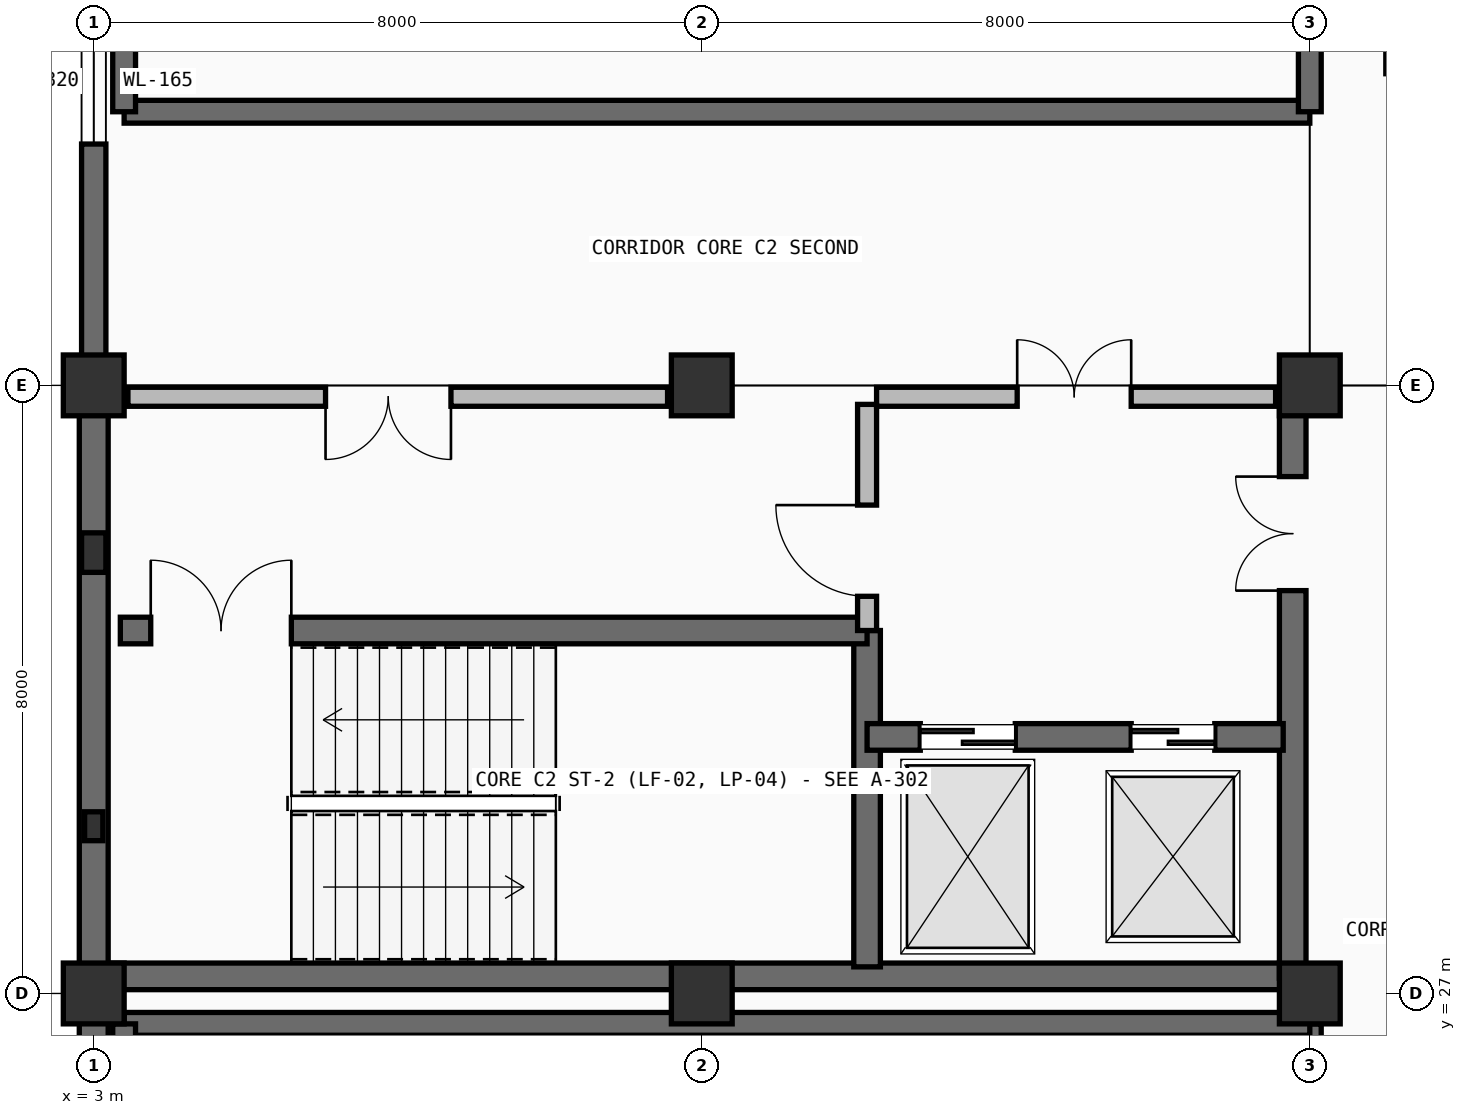
"""IFC4 building model, lengths in metres.
Left out: names, types, materials, properties, quantities, classifications, styles, units other than length and angle.
Written with IfcOpenShell. Run it as: python <this file> out.ifc"""

import sys

from ifc_helpers import new_model, si_unit, direction, frame, frame_2d, origin, origin_2d, place, context, subcontext, project, spatial, rectangle, extrude, element, fill, save


model = new_model("IFC4")
c1 = context("Model", 3, precision=1e-05, world=origin(), true_north=direction((0.0, 1.0)))
c2 = subcontext(c1, "Body", "Model", "MODEL_VIEW")
j1 = project(units=[si_unit("LENGTHUNIT", "METRE"), si_unit("PLANEANGLEUNIT", "RADIAN")], contexts=[c1])
p1 = place(None, origin())
s1 = spatial("IfcSite", under=j1, at=p1, CompositionType="ELEMENT")
p2 = place(p1, origin())
s2 = spatial("IfcBuilding", under=s1, at=p2, CompositionType="ELEMENT")
p3 = place(p2, frame((0.0, 0.0, 9.9)))
s3 = spatial("IfcBuildingStorey", under=s2, at=p3, CompositionType="ELEMENT", Elevation=9.9)
for number, where, z_axis, x_axis in (
    (1, (3.0, 27.0, 0.0), (0.0, 0.0, 1.0), (1.0, 0.0, 0.0)),
    (2, (3.0, 35.0, 0.0), (0.0, 0.0, 1.0), (1.0, 0.0, 0.0)),
    (3, (11.0, 27.0, 0.0), (0.0, 0.0, 1.0), (1.0, 0.0, 0.0)),
    (4, (11.0, 35.0, 0.0), (0.0, 0.0, 1.0), (1.0, 0.0, 0.0)),
    (5, (19.0, 27.0, 0.0), (0.0, 0.0, 1.0), (1.0, 0.0, 0.0)),
    (6, (19.0, 35.0, 0.0), (0.0, 0.0, 1.0), (1.0, 0.0, 0.0)),
):
    element("IfcColumn", number, at=place(p3, frame(where, z_axis=z_axis, x_axis=x_axis)), inside=s3, PredefinedType="COLUMN", context=c2, shape_type="SweptSolid", body=[
        extrude(rectangle(XDim=0.8, YDim=0.8, at=origin_2d()), origin(), (0.0, 0.0, 1.0), 4.5),
    ])
p4 = place(p3, frame((3.0, 29.2, 0.0), z_axis=(0.0, 0.0, 1.0), x_axis=(0.0, 1.0, 0.0)))
e7 = element("IfcColumn", 7, at=p4, inside=s3, PredefinedType="PILASTER", context=c2, shape_type="SweptSolid", body=[
    extrude(rectangle(XDim=0.38, YDim=0.24, at=origin_2d()), origin(), (0.0, 0.0, 1.0), 4.5),
])
p5 = place(p3, frame((3.0, 32.8, 0.0), z_axis=(0.0, 0.0, 1.0), x_axis=(0.0, 1.0, 0.0)))
e8 = element("IfcColumn", 8, at=p5, inside=s3, PredefinedType="PILASTER", context=c2, shape_type="SweptSolid", body=[
    extrude(rectangle(XDim=0.52, YDim=0.32, at=origin_2d()), origin(), (0.0, 0.0, 1.0), 4.5),
])
p6 = place(p3, frame((3.0, 19.0, 0.0), z_axis=(0.0, 0.0, 1.0), x_axis=(0.0, 1.0, 0.0)))
e9 = element("IfcWall", 9, at=p6, inside=s3, PredefinedType="SOLIDWALL", context=c2, shape_type="SweptSolid", body=[
    extrude(rectangle(XDim=8.0, YDim=0.38, at=frame_2d((4.0, 0.0))), origin(), (0.0, 0.0, 1.0), 4.5),
])
p7 = place(p6, frame((1.26, 0.0, 1.05)))
e10 = element("IfcOpeningElement", 10, at=p7, cuts=e9, PredefinedType="OPENING", context=c2, shape_type="SweptSolid", body=[
    extrude(rectangle(XDim=1.32, YDim=2.05, at=frame_2d((0.66, 1.025))), frame((0.0, 0.2, 0.0), z_axis=(0.0, -1.0, 0.0), x_axis=(1.0, 0.0, 0.0)), (0.0, 0.0, 1.0), 0.4),
])
p8 = place(p6, frame((3.4, 0.0, 1.05)))
e11 = element("IfcOpeningElement", 11, at=p8, cuts=e9, PredefinedType="OPENING", context=c2, shape_type="SweptSolid", body=[
    extrude(rectangle(XDim=1.2, YDim=1.9, at=frame_2d((0.6, 0.95))), frame((0.0, 0.2, 0.0), z_axis=(0.0, -1.0, 0.0), x_axis=(1.0, 0.0, 0.0)), (0.0, 0.0, 1.0), 0.4),
])
p9 = place(p6, frame((5.51, 0.0, 1.05)))
e12 = element("IfcOpeningElement", 12, at=p9, cuts=e9, PredefinedType="OPENING", context=c2, shape_type="SweptSolid", body=[
    extrude(rectangle(XDim=1.14, YDim=1.8, at=frame_2d((0.57, 0.9))), frame((0.0, 0.2, 0.0), z_axis=(0.0, -1.0, 0.0), x_axis=(1.0, 0.0, 0.0)), (0.0, 0.0, 1.0), 0.4),
])
p10 = place(p3, frame((3.0, 27.0, 0.0), z_axis=(0.0, 0.0, 1.0), x_axis=(0.0, 1.0, 0.0)))
e13 = element("IfcWall", 13, at=p10, inside=s3, PredefinedType="SOLIDWALL", context=c2, shape_type="SweptSolid", body=[
    extrude(rectangle(XDim=8.0, YDim=0.38, at=frame_2d((4.0, 0.0))), origin(), (0.0, 0.0, 1.0), 4.5),
])
p11 = place(p3, frame((3.0, 35.0, 0.0), z_axis=(0.0, 0.0, 1.0), x_axis=(0.0, 1.0, 0.0)))
e14 = element("IfcWall", 14, at=p11, inside=s3, PredefinedType="SOLIDWALL", context=c2, shape_type="SweptSolid", body=[
    extrude(rectangle(XDim=8.0, YDim=0.32, at=frame_2d((4.0, 0.0))), origin(), (0.0, 0.0, 1.0), 4.5),
])
p12 = place(p11, frame((3.175, 0.0, 1.1)))
e15 = element("IfcOpeningElement", 15, at=p12, cuts=e14, PredefinedType="OPENING", context=c2, shape_type="SweptSolid", body=[
    extrude(rectangle(XDim=1.65, YDim=0.8, at=frame_2d((0.825, 0.4))), frame((0.0, 0.17, 0.0), z_axis=(0.0, -1.0, 0.0), x_axis=(1.0, 0.0, 0.0)), (0.0, 0.0, 1.0), 0.34),
])
p13 = place(p3, frame((3.2, 27.225, 0.0), z_axis=(0.0, 0.0, 1.0), x_axis=(1.0, 0.0, 0.0)))
e16 = element("IfcWall", 16, at=p13, inside=s3, PredefinedType="SHEAR", context=c2, shape_type="SweptSolid", body=[
    extrude(rectangle(XDim=15.6, YDim=0.35, at=frame_2d((7.8, 0.0))), origin(), (0.0, 0.0, 1.0), 4.2),
])
p14 = place(p3, frame((13.175, 27.35, 0.0), z_axis=(0.0, 0.0, 1.0), x_axis=(0.0, 1.0, 0.0)))
e17 = element("IfcWall", 17, at=p14, inside=s3, PredefinedType="SHEAR", context=c2, shape_type="SweptSolid", body=[
    extrude(rectangle(XDim=4.425, YDim=0.35, at=frame_2d((2.212, 0.0))), origin(), (0.0, 0.0, 1.0), 4.2),
])
p15 = place(p3, frame((18.775, 27.2, 0.0), z_axis=(0.0, 0.0, 1.0), x_axis=(0.0, 1.0, 0.0)))
e18 = element("IfcWall", 18, at=p15, inside=s3, PredefinedType="SHEAR", context=c2, shape_type="SweptSolid", body=[
    extrude(rectangle(XDim=7.6, YDim=0.35, at=frame_2d((3.8, 0.0))), origin(), (0.0, 0.0, 1.0), 4.2),
])
p16 = place(p15, frame((5.1, 0.0, 0.0)))
e19 = element("IfcOpeningElement", 19, at=p16, cuts=e18, PredefinedType="OPENING", context=c2, shape_type="SweptSolid", body=[
    extrude(rectangle(XDim=1.5, YDim=2.2, at=frame_2d((0.75, 1.1))), frame((0.0, 0.185, 0.0), z_axis=(0.0, -1.0, 0.0), x_axis=(1.0, 0.0, 0.0)), (0.0, 0.0, 1.0), 0.37),
])
p17 = place(p3, frame((3.35, 31.775, 0.0), z_axis=(0.0, 0.0, 1.0), x_axis=(1.0, 0.0, 0.0)))
e20 = element("IfcWall", 20, at=p17, inside=s3, PredefinedType="SHEAR", context=c2, shape_type="SweptSolid", body=[
    extrude(rectangle(XDim=9.825, YDim=0.35, at=frame_2d((4.913, 0.0))), origin(), (0.0, 0.0, 1.0), 4.2),
])
p18 = place(p17, frame((0.4, 0.0, 0.0)))
e21 = element("IfcOpeningElement", 21, at=p18, cuts=e20, PredefinedType="OPENING", context=c2, shape_type="SweptSolid", body=[
    extrude(rectangle(XDim=1.85, YDim=2.25, at=frame_2d((0.925, 1.125))), frame((0.0, 0.185, 0.0), z_axis=(0.0, -1.0, 0.0), x_axis=(1.0, 0.0, 0.0)), (0.0, 0.0, 1.0), 0.37),
])
p19 = place(p3, frame((13.175, 30.375, 0.0), z_axis=(0.0, 0.0, 1.0), x_axis=(1.0, 0.0, 0.0)))
e22 = element("IfcWall", 22, at=p19, inside=s3, PredefinedType="SHEAR", context=c2, shape_type="SweptSolid", body=[
    extrude(rectangle(XDim=5.475, YDim=0.35, at=frame_2d((2.737, 0.0))), origin(), (0.0, 0.0, 1.0), 4.2),
])
p20 = place(p19, frame((0.7, 0.0, 0.0)))
e23 = element("IfcOpeningElement", 23, at=p20, cuts=e22, PredefinedType="OPENING", context=c2, shape_type="SweptSolid", body=[
    extrude(rectangle(XDim=1.25, YDim=2.25, at=frame_2d((0.625, 1.125))), frame((0.0, 0.185, 0.0), z_axis=(0.0, -1.0, 0.0), x_axis=(1.0, 0.0, 0.0)), (0.0, 0.0, 1.0), 0.37),
])
p21 = place(p19, frame((3.475, 0.0, 0.0)))
e24 = element("IfcOpeningElement", 24, at=p21, cuts=e22, PredefinedType="OPENING", context=c2, shape_type="SweptSolid", body=[
    extrude(rectangle(XDim=1.1, YDim=2.2, at=frame_2d((0.55, 1.1))), frame((0.0, 0.185, 0.0), z_axis=(0.0, -1.0, 0.0), x_axis=(1.0, 0.0, 0.0)), (0.0, 0.0, 1.0), 0.37),
])
p22 = place(p3, frame((13.175, 31.775, 0.0), z_axis=(0.0, 0.0, 1.0), x_axis=(0.0, 1.0, 0.0)))
e25 = element("IfcWall", 25, at=p22, inside=s3, PredefinedType="PARTITIONING", context=c2, shape_type="SweptSolid", body=[
    extrude(rectangle(XDim=2.975, YDim=0.25, at=frame_2d((1.488, 0.0))), origin(), (0.0, 0.0, 1.0), 4.2),
])
p23 = place(p22, frame((0.45, 0.0, 0.0)))
e26 = element("IfcOpeningElement", 26, at=p23, cuts=e25, PredefinedType="OPENING", context=c2, shape_type="SweptSolid", body=[
    extrude(rectangle(XDim=1.2, YDim=2.2, at=frame_2d((0.6, 1.1))), frame((0.0, 0.135, 0.0), z_axis=(0.0, -1.0, 0.0), x_axis=(1.0, 0.0, 0.0)), (0.0, 0.0, 1.0), 0.27),
])
p24 = place(p3, frame((3.45, 34.85, 0.0), z_axis=(0.0, 0.0, 1.0), x_axis=(1.0, 0.0, 0.0)))
e27 = element("IfcWall", 27, at=p24, inside=s3, PredefinedType="PARTITIONING", context=c2, shape_type="SweptSolid", body=[
    extrude(rectangle(XDim=7.1, YDim=0.25, at=frame_2d((3.55, 0.0))), origin(), (0.0, 0.0, 1.0), 3.535),
])
p25 = place(p24, frame((2.6, 0.0, 0.0)))
e28 = element("IfcOpeningElement", 28, at=p25, cuts=e27, PredefinedType="OPENING", context=c2, shape_type="SweptSolid", body=[
    extrude(rectangle(XDim=1.65, YDim=2.25, at=frame_2d((0.825, 1.125))), frame((0.0, 0.135, 0.0), z_axis=(0.0, -1.0, 0.0), x_axis=(1.0, 0.0, 0.0)), (0.0, 0.0, 1.0), 0.27),
])
p26 = place(p3, frame((13.3, 34.85, 0.0), z_axis=(0.0, 0.0, 1.0), x_axis=(1.0, 0.0, 0.0)))
e29 = element("IfcWall", 29, at=p26, inside=s3, PredefinedType="PARTITIONING", context=c2, shape_type="SweptSolid", body=[
    extrude(rectangle(XDim=5.25, YDim=0.25, at=frame_2d((2.625, 0.0))), origin(), (0.0, 0.0, 1.0), 3.535),
])
p27 = place(p26, frame((1.85, 0.0, 0.0)))
e30 = element("IfcOpeningElement", 30, at=p27, cuts=e29, PredefinedType="OPENING", context=c2, shape_type="SweptSolid", body=[
    extrude(rectangle(XDim=1.5, YDim=2.2, at=frame_2d((0.75, 1.1))), frame((0.0, 0.135, 0.0), z_axis=(0.0, -1.0, 0.0), x_axis=(1.0, 0.0, 0.0)), (0.0, 0.0, 1.0), 0.27),
])
p28 = place(p3, frame((19.0, 14.6, 0.0), z_axis=(0.0, 0.0, 1.0), x_axis=(0.0, 1.0, 0.0)))
e31 = element("IfcWall", 31, at=p28, inside=s3, PredefinedType="SHEAR", context=c2, shape_type="SweptSolid", body=[
    extrude(rectangle(XDim=12.0, YDim=0.3, at=frame_2d((6.0, 0.0))), origin(), (0.0, 0.0, 1.0), 4.2),
])
p29 = place(p28, frame((7.614, 0.0, 0.0)))
e32 = element("IfcOpeningElement", 32, at=p29, cuts=e31, PredefinedType="OPENING", context=c2, shape_type="SweptSolid", body=[
    extrude(rectangle(XDim=1.65, YDim=2.25, at=frame_2d((0.825, 1.125))), frame((0.0, 0.16, 0.0), z_axis=(0.0, -1.0, 0.0), x_axis=(1.0, 0.0, 0.0)), (0.0, 0.0, 1.0), 0.32),
])
p30 = place(p3, frame((3.4, 26.6, 0.0), z_axis=(0.0, 0.0, 1.0), x_axis=(1.0, 0.0, 0.0)))
e33 = element("IfcWall", 33, at=p30, inside=s3, PredefinedType="SHEAR", context=c2, shape_type="SweptSolid", body=[
    extrude(rectangle(XDim=15.6, YDim=0.3, at=frame_2d((7.8, 0.0))), origin(), (0.0, 0.0, 1.0), 4.2),
])
p31 = place(p3, frame((3.4, 14.6, 0.0), z_axis=(0.0, 0.0, 1.0), x_axis=(0.0, 1.0, 0.0)))
e34 = element("IfcWall", 34, at=p31, inside=s3, PredefinedType="SHEAR", context=c2, shape_type="SweptSolid", body=[
    extrude(rectangle(XDim=12.0, YDim=0.3, at=frame_2d((6.0, 0.0))), origin(), (0.0, 0.0, 1.0), 4.2),
])
p32 = place(p3, frame((3.4, 38.6, 0.0), z_axis=(0.0, 0.0, 1.0), x_axis=(1.0, 0.0, 0.0)))
e35 = element("IfcWall", 35, at=p32, inside=s3, PredefinedType="SHEAR", context=c2, shape_type="SweptSolid", body=[
    extrude(rectangle(XDim=15.6, YDim=0.3, at=frame_2d((7.8, 0.0))), origin(), (0.0, 0.0, 1.0), 4.2),
])
p33 = place(p3, frame((19.0, 38.6, 0.0), z_axis=(0.0, 0.0, 1.0), x_axis=(0.0, 1.0, 0.0)))
e36 = element("IfcWall", 36, at=p33, inside=s3, PredefinedType="SHEAR", context=c2, shape_type="SweptSolid", body=[
    extrude(rectangle(XDim=25.0, YDim=0.3, at=frame_2d((12.5, 0.0))), origin(), (0.0, 0.0, 1.0), 4.2),
])
p34 = place(p33, frame((15.609, 0.0, 0.0)))
e37 = element("IfcOpeningElement", 37, at=p34, cuts=e36, PredefinedType="OPENING", context=c2, shape_type="SweptSolid", body=[
    extrude(rectangle(XDim=1.4, YDim=2.22, at=frame_2d((0.7, 1.11))), frame((0.0, 0.16, 0.0), z_axis=(0.0, -1.0, 0.0), x_axis=(1.0, 0.0, 0.0)), (0.0, 0.0, 1.0), 0.32),
])
p35 = place(p3, frame((3.4, 38.6, 0.0), z_axis=(0.0, 0.0, 1.0), x_axis=(0.0, 1.0, 0.0)))
e38 = element("IfcWall", 38, at=p35, inside=s3, PredefinedType="SHEAR", context=c2, shape_type="SweptSolid", body=[
    extrude(rectangle(XDim=25.0, YDim=0.3, at=frame_2d((12.5, 0.0))), origin(), (0.0, 0.0, 1.0), 4.2),
])
p36 = place(p12, origin())
e39 = element("IfcWindow", 39, at=p36, inside=s3, PartitioningType="SINGLE_PANEL", PredefinedType="WINDOW", context=c2, shape_type="SweptSolid", body=[
    extrude(rectangle(XDim=1.65, YDim=0.8, at=frame_2d((0.825, 0.4))), frame((0.0, 0.03, 0.0), z_axis=(0.0, -1.0, 0.0), x_axis=(1.0, 0.0, 0.0)), (0.0, 0.0, 1.0), 0.06),
])
fill(e15, e39)
p37 = place(p18, origin())
e40 = element("IfcDoor", 40, at=p37, inside=s3, OperationType="DOUBLE_DOOR_SINGLE_SWING", PredefinedType="DOOR", context=c2, shape_type="SweptSolid", body=[
    extrude(rectangle(XDim=1.85, YDim=2.25, at=frame_2d((0.925, 1.125))), frame((0.0, 0.025, 0.0), z_axis=(0.0, -1.0, 0.0), x_axis=(1.0, 0.0, 0.0)), (0.0, 0.0, 1.0), 0.05),
])
fill(e21, e40)
p38 = place(p20, origin())
e41 = element("IfcDoor", 41, at=p38, inside=s3, OperationType="DOUBLE_DOOR_SLIDING", PredefinedType="DOOR", context=c2, shape_type="SweptSolid", body=[
    extrude(rectangle(XDim=1.25, YDim=2.25, at=frame_2d((0.625, 1.125))), frame((0.0, 0.025, 0.0), z_axis=(0.0, -1.0, 0.0), x_axis=(1.0, 0.0, 0.0)), (0.0, 0.0, 1.0), 0.05),
])
fill(e23, e41)
p39 = place(p21, origin())
e42 = element("IfcDoor", 42, at=p39, inside=s3, OperationType="DOUBLE_DOOR_SLIDING", PredefinedType="DOOR", context=c2, shape_type="SweptSolid", body=[
    extrude(rectangle(XDim=1.1, YDim=2.2, at=frame_2d((0.55, 1.1))), frame((0.0, 0.025, 0.0), z_axis=(0.0, -1.0, 0.0), x_axis=(1.0, 0.0, 0.0)), (0.0, 0.0, 1.0), 0.05),
])
fill(e24, e42)
p40 = place(p23, origin())
e43 = element("IfcDoor", 43, at=p40, inside=s3, OperationType="SINGLE_SWING_RIGHT", PredefinedType="DOOR", context=c2, shape_type="SweptSolid", body=[
    extrude(rectangle(XDim=1.2, YDim=2.2, at=frame_2d((0.6, 1.1))), frame((0.0, 0.025, 0.0), z_axis=(0.0, -1.0, 0.0), x_axis=(1.0, 0.0, 0.0)), (0.0, 0.0, 1.0), 0.05),
])
fill(e26, e43)
p41 = place(p25, frame((1.65, 0.0, 0.0), z_axis=(0.0, 0.0, 1.0), x_axis=(-1.0, 0.0, 0.0)))
e44 = element("IfcDoor", 44, at=p41, inside=s3, OperationType="DOUBLE_DOOR_SINGLE_SWING", PredefinedType="DOOR", context=c2, shape_type="SweptSolid", body=[
    extrude(rectangle(XDim=1.65, YDim=2.25, at=frame_2d((0.825, 1.125))), frame((0.0, 0.025, 0.0), z_axis=(0.0, -1.0, 0.0), x_axis=(1.0, 0.0, 0.0)), (0.0, 0.0, 1.0), 0.05),
])
fill(e28, e44)
p42 = place(p27, origin())
e45 = element("IfcDoor", 45, at=p42, inside=s3, OperationType="DOUBLE_DOOR_SINGLE_SWING", PredefinedType="DOOR", context=c2, shape_type="SweptSolid", body=[
    extrude(rectangle(XDim=1.5, YDim=2.2, at=frame_2d((0.75, 1.1))), frame((0.0, 0.025, 0.0), z_axis=(0.0, -1.0, 0.0), x_axis=(1.0, 0.0, 0.0)), (0.0, 0.0, 1.0), 0.05),
])
fill(e30, e45)
p43 = place(p16, origin())
e46 = element("IfcDoor", 46, at=p43, inside=s3, OperationType="DOUBLE_DOOR_SINGLE_SWING", PredefinedType="DOOR", context=c2, shape_type="SweptSolid", body=[
    extrude(rectangle(XDim=1.5, YDim=2.2, at=frame_2d((0.75, 1.1))), frame((0.0, 0.025, 0.0), z_axis=(0.0, -1.0, 0.0), x_axis=(1.0, 0.0, 0.0)), (0.0, 0.0, 1.0), 0.05),
])
fill(e19, e46)
save(model, sys.argv[1])
